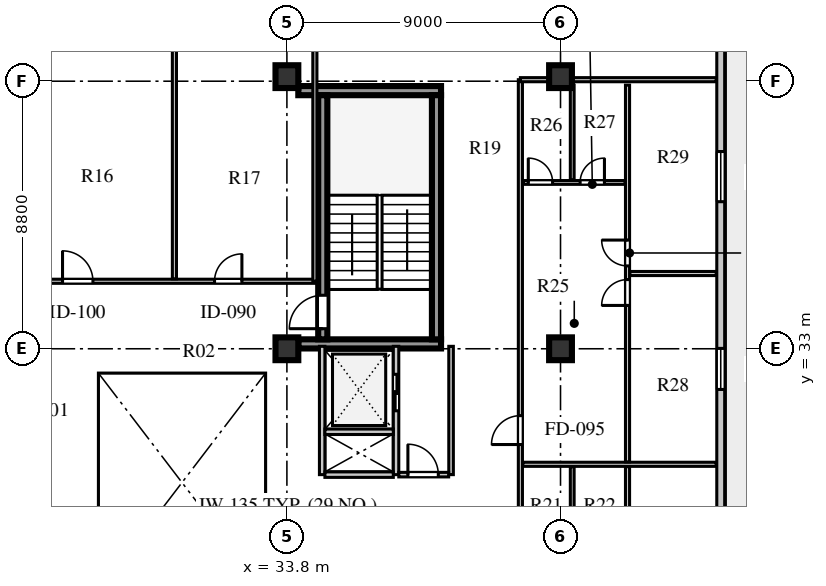
"""IFC4 building model, lengths in metres.
Left out: names, types, materials, properties, quantities, classifications, styles, units other than length and angle.
Written with IfcOpenShell. Run it as: python <this file> out.ifc"""

import sys

from ifc_helpers import new_model, si_unit, direction, frame, frame_2d, origin, origin_2d, place, context, subcontext, project, spatial, rectangle, extrude, element, fill, save


model = new_model("IFC4")
c1 = context("Model", 3, precision=1e-05, world=origin(), true_north=direction((0.0, 1.0)))
c2 = subcontext(c1, "Body", "Model", "MODEL_VIEW")
j1 = project(units=[si_unit("LENGTHUNIT", "METRE"), si_unit("PLANEANGLEUNIT", "RADIAN")], contexts=[c1])
p1 = place(None, origin())
s1 = spatial("IfcSite", under=j1, at=p1, CompositionType="ELEMENT")
p2 = place(p1, origin())
s2 = spatial("IfcBuilding", under=s1, at=p2, CompositionType="ELEMENT")
p3 = place(p2, frame((0.0, 0.0, 296.0)))
s3 = spatial("IfcBuildingStorey", under=s2, at=p3, CompositionType="ELEMENT", Elevation=296.0)
for number, where, z_axis, x_axis in (
    (1, (34.175, 33.16, 0.0), (0.0, 0.0, 1.0), (1.0, 0.0, 0.0)),
    (2, (34.175, 41.49, 0.0), (0.0, 0.0, 1.0), (1.0, 0.0, 0.0)),
):
    element("IfcWall", number, at=place(p3, frame(where, z_axis=z_axis, x_axis=x_axis)), inside=s3, PredefinedType="SHEAR", context=c2, shape_type="SweptSolid", body=[
        extrude(rectangle(XDim=4.695, YDim=0.3, at=frame_2d((2.348, 0.0))), origin(), (0.0, 0.0, 1.0), 3.66),
    ])
p4 = place(p3, frame((34.98, 33.31, 0.0), z_axis=(0.0, 0.0, 1.0), x_axis=(0.0, 1.0, 0.0)))
e3 = element("IfcWall", 3, at=p4, inside=s3, PredefinedType="SHEAR", context=c2, shape_type="SweptSolid", body=[
    extrude(rectangle(XDim=8.03, YDim=0.3, at=frame_2d((4.015, 0.0))), origin(), (0.0, 0.0, 1.0), 3.66),
])
p5 = place(p4, frame((0.35, 0.0, 0.0)))
e4 = element("IfcOpeningElement", 4, at=p5, cuts=e3, PredefinedType="OPENING", context=c2, shape_type="SweptSolid", body=[
    extrude(rectangle(XDim=1.1, YDim=2.1, at=frame_2d((0.55, 1.05))), frame((0.0, 0.16, 0.0), z_axis=(0.0, -1.0, 0.0), x_axis=(1.0, 0.0, 0.0)), (0.0, 0.0, 1.0), 0.32),
])
p6 = place(p3, frame((38.72, 33.31, 0.0), z_axis=(0.0, 0.0, 1.0), x_axis=(0.0, 1.0, 0.0)))
e5 = element("IfcWall", 5, at=p6, inside=s3, PredefinedType="SHEAR", context=c2, shape_type="SweptSolid", body=[
    extrude(rectangle(XDim=8.03, YDim=0.3, at=frame_2d((4.015, 0.0))), origin(), (0.0, 0.0, 1.0), 3.66),
])
for number, where, z_axis, x_axis in (
    (6, (33.8, 33.0, 0.0), (0.0, 0.0, 1.0), (1.0, 0.0, 0.0)),
    (7, (33.8, 41.95, 0.0), (0.0, 0.0, 1.0), (1.0, 0.0, 0.0)),
    (8, (42.8, 33.0, 0.0), (0.0, 0.0, 1.0), (1.0, 0.0, 0.0)),
    (9, (42.8, 41.95, 0.0), (0.0, 0.0, 1.0), (1.0, 0.0, 0.0)),
):
    element("IfcColumn", number, at=place(p3, frame(where, z_axis=z_axis, x_axis=x_axis)), inside=s3, PredefinedType="COLUMN", context=c2, shape_type="SweptSolid", body=[
        extrude(rectangle(XDim=0.75, YDim=0.75, at=origin_2d()), origin(), (0.0, 0.0, 1.0), 3.66),
    ])
p7 = place(p3, frame((48.07, 13.41, 0.0), z_axis=(0.0, 0.0, 1.0), x_axis=(0.0, 1.0, 0.0)))
e10 = element("IfcWall", 10, at=p7, inside=s3, PredefinedType="SOLIDWALL", context=c2, shape_type="SweptSolid", body=[
    extrude(rectangle(XDim=30.38, YDim=0.26, at=frame_2d((15.19, 0.0))), origin(), (0.0, 0.0, 1.0), 3.66),
])
p8 = place(p7, frame((2.43, 0.0, 0.0)))
e11 = element("IfcOpeningElement", 11, at=p8, cuts=e10, PredefinedType="OPENING", context=c2, shape_type="SweptSolid", body=[
    extrude(rectangle(XDim=1.0, YDim=2.05, at=frame_2d((0.5, 1.025))), frame((0.0, 0.14, 0.0), z_axis=(0.0, -1.0, 0.0), x_axis=(1.0, 0.0, 0.0)), (0.0, 0.0, 1.0), 0.28),
])
p9 = place(p7, frame((5.002, 0.0, 0.8)))
e12 = element("IfcOpeningElement", 12, at=p9, cuts=e10, PredefinedType="OPENING", context=c2, shape_type="SweptSolid", body=[
    extrude(rectangle(XDim=2.4, YDim=2.05, at=frame_2d((1.2, 1.025))), frame((0.0, 0.14, 0.0), z_axis=(0.0, -1.0, 0.0), x_axis=(1.0, 0.0, 0.0)), (0.0, 0.0, 1.0), 0.28),
])
p10 = place(p7, frame((11.302, 0.0, 0.8)))
e13 = element("IfcOpeningElement", 13, at=p10, cuts=e10, PredefinedType="OPENING", context=c2, shape_type="SweptSolid", body=[
    extrude(rectangle(XDim=2.1, YDim=1.95, at=frame_2d((1.05, 0.975))), frame((0.0, 0.14, 0.0), z_axis=(0.0, -1.0, 0.0), x_axis=(1.0, 0.0, 0.0)), (0.0, 0.0, 1.0), 0.28),
])
p11 = place(p7, frame((18.252, 0.0, 0.8)))
e14 = element("IfcOpeningElement", 14, at=p11, cuts=e10, PredefinedType="OPENING", context=c2, shape_type="SweptSolid", body=[
    extrude(rectangle(XDim=1.35, YDim=1.9, at=frame_2d((0.675, 0.95))), frame((0.0, 0.14, 0.0), z_axis=(0.0, -1.0, 0.0), x_axis=(1.0, 0.0, 0.0)), (0.0, 0.0, 1.0), 0.28),
])
p12 = place(p7, frame((24.427, 0.0, 0.8)))
e15 = element("IfcOpeningElement", 15, at=p12, cuts=e10, PredefinedType="OPENING", context=c2, shape_type="SweptSolid", body=[
    extrude(rectangle(XDim=1.65, YDim=1.95, at=frame_2d((0.825, 0.975))), frame((0.0, 0.14, 0.0), z_axis=(0.0, -1.0, 0.0), x_axis=(1.0, 0.0, 0.0)), (0.0, 0.0, 1.0), 0.28),
])
p13 = place(p3, frame((34.96, 28.86, 0.0), z_axis=(0.0, 0.0, 1.0), x_axis=(0.0, 1.0, 0.0)))
e16 = element("IfcWall", 16, at=p13, inside=s3, PredefinedType="SOLIDWALL", context=c2, shape_type="SweptSolid", body=[
    extrude(rectangle(XDim=4.22, YDim=0.18, at=frame_2d((2.11, 0.0))), origin(), (0.0, 0.0, 1.0), 3.66),
])
p14 = place(p3, frame((37.39, 28.86, 0.0), z_axis=(0.0, 0.0, 1.0), x_axis=(0.0, 1.0, 0.0)))
e17 = element("IfcWall", 17, at=p14, inside=s3, PredefinedType="SOLIDWALL", context=c2, shape_type="SweptSolid", body=[
    extrude(rectangle(XDim=4.22, YDim=0.18, at=frame_2d((2.11, 0.0))), origin(), (0.0, 0.0, 1.0), 3.66),
])
p15 = place(p14, frame((2.1, 0.0, 0.0)))
e18 = element("IfcOpeningElement", 18, at=p15, cuts=e17, PredefinedType="OPENING", context=c2, shape_type="SweptSolid", body=[
    extrude(rectangle(XDim=1.2, YDim=2.12, at=frame_2d((0.6, 1.06))), frame((0.0, 0.1, 0.0), z_axis=(0.0, -1.0, 0.0), x_axis=(1.0, 0.0, 0.0)), (0.0, 0.0, 1.0), 0.2),
])
for number, where, z_axis, x_axis in (
    (19, (35.05, 28.86, 0.0), (0.0, 0.0, 1.0), (1.0, 0.0, 0.0)),
    (20, (35.05, 30.27, 0.0), (0.0, 0.0, 1.0), (1.0, 0.0, 0.0)),
):
    element("IfcWall", number, at=place(p3, frame(where, z_axis=z_axis, x_axis=x_axis)), inside=s3, PredefinedType="SOLIDWALL", context=c2, shape_type="SweptSolid", body=[
        extrude(rectangle(XDim=2.25, YDim=0.18, at=frame_2d((1.125, 0.0))), origin(), (0.0, 0.0, 1.0), 3.66),
    ])
p16 = place(p3, frame((39.2, 28.86, 0.0), z_axis=(0.0, 0.0, 1.0), x_axis=(0.0, 1.0, 0.0)))
e21 = element("IfcWall", 21, at=p16, inside=s3, PredefinedType="PARTITIONING", context=c2, shape_type="SweptSolid", body=[
    extrude(rectangle(XDim=4.22, YDim=0.15, at=frame_2d((2.11, 0.0))), origin(), (0.0, 0.0, 1.0), 3.66),
])
p17 = place(p3, frame((37.48, 28.86, 0.0), z_axis=(0.0, 0.0, 1.0), x_axis=(1.0, 0.0, 0.0)))
e22 = element("IfcWall", 22, at=p17, inside=s3, PredefinedType="PARTITIONING", context=c2, shape_type="SweptSolid", body=[
    extrude(rectangle(XDim=1.64, YDim=0.15, at=frame_2d((0.82, 0.0))), origin(), (0.0, 0.0, 1.0), 3.66),
])
p18 = place(p17, frame((0.3, 0.0, 0.0)))
e23 = element("IfcOpeningElement", 23, at=p18, cuts=e22, PredefinedType="OPENING", context=c2, shape_type="SweptSolid", body=[
    extrude(rectangle(XDim=1.0, YDim=2.1, at=frame_2d((0.5, 1.05))), frame((0.0, 0.085, 0.0), z_axis=(0.0, -1.0, 0.0), x_axis=(1.0, 0.0, 0.0)), (0.0, 0.0, 1.0), 0.17),
])
p19 = place(p3, frame((25.22, 35.22, 0.0), z_axis=(0.0, 0.0, 1.0), x_axis=(1.0, 0.0, 0.0)))
e24 = element("IfcWall", 24, at=p19, inside=s3, PredefinedType="PARTITIONING", context=c2, shape_type="SweptSolid", body=[
    extrude(rectangle(XDim=9.5, YDim=0.135, at=frame_2d((4.75, 0.0))), origin(), (0.0, 0.0, 1.0), 3.66),
])
p20 = place(p19, frame((1.2, 0.0, 0.0)))
e25 = element("IfcOpeningElement", 25, at=p20, cuts=e24, PredefinedType="OPENING", context=c2, shape_type="SweptSolid", body=[
    extrude(rectangle(XDim=1.0, YDim=2.08, at=frame_2d((0.5, 1.04))), frame((0.0, 0.078, 0.0), z_axis=(0.0, -1.0, 0.0), x_axis=(1.0, 0.0, 0.0)), (0.0, 0.0, 1.0), 0.155),
])
p21 = place(p19, frame((6.2, 0.0, 0.0)))
e26 = element("IfcOpeningElement", 26, at=p21, cuts=e24, PredefinedType="OPENING", context=c2, shape_type="SweptSolid", body=[
    extrude(rectangle(XDim=0.9, YDim=2.08, at=frame_2d((0.45, 1.04))), frame((0.0, 0.078, 0.0), z_axis=(0.0, -1.0, 0.0), x_axis=(1.0, 0.0, 0.0)), (0.0, 0.0, 1.0), 0.155),
])
p22 = place(p3, frame((34.72, 35.22, 0.0), z_axis=(0.0, 0.0, 1.0), x_axis=(0.0, 1.0, 0.0)))
e27 = element("IfcWall", 27, at=p22, inside=s3, PredefinedType="PARTITIONING", context=c2, shape_type="SweptSolid", body=[
    extrude(rectangle(XDim=11.6, YDim=0.135, at=frame_2d((5.8, 0.0))), origin(), (0.0, 0.0, 1.0), 3.66),
])
p23 = place(p3, frame((30.1, 35.3, 0.0), z_axis=(0.0, 0.0, 1.0), x_axis=(0.0, 1.0, 0.0)))
e28 = element("IfcWall", 28, at=p23, inside=s3, PredefinedType="PARTITIONING", context=c2, shape_type="SweptSolid", body=[
    extrude(rectangle(XDim=11.52, YDim=0.135, at=frame_2d((5.76, 0.0))), origin(), (0.0, 0.0, 1.0), 3.66),
])
p24 = place(p3, frame((41.48, 15.35, 0.0), z_axis=(0.0, 0.0, 1.0), x_axis=(0.0, 1.0, 0.0)))
e29 = element("IfcWall", 29, at=p24, inside=s3, PredefinedType="PARTITIONING", context=c2, shape_type="SweptSolid", body=[
    extrude(rectangle(XDim=26.5, YDim=0.135, at=frame_2d((13.25, 0.0))), origin(), (0.0, 0.0, 1.0), 3.66),
])
p25 = place(p24, frame((0.75, 0.0, 0.0)))
e30 = element("IfcOpeningElement", 30, at=p25, cuts=e29, PredefinedType="OPENING", context=c2, shape_type="SweptSolid", body=[
    extrude(rectangle(XDim=0.95, YDim=2.1, at=frame_2d((0.475, 1.05))), frame((0.0, 0.078, 0.0), z_axis=(0.0, -1.0, 0.0), x_axis=(1.0, 0.0, 0.0)), (0.0, 0.0, 1.0), 0.155),
])
p26 = place(p24, frame((14.5, 0.0, 0.0)))
e31 = element("IfcOpeningElement", 31, at=p26, cuts=e29, PredefinedType="OPENING", context=c2, shape_type="SweptSolid", body=[
    extrude(rectangle(XDim=0.95, YDim=2.1, at=frame_2d((0.475, 1.05))), frame((0.0, 0.078, 0.0), z_axis=(0.0, -1.0, 0.0), x_axis=(1.0, 0.0, 0.0)), (0.0, 0.0, 1.0), 0.155),
])
p27 = place(p3, frame((41.48, 41.85, 0.0), z_axis=(0.0, 0.0, 1.0), x_axis=(1.0, 0.0, 0.0)))
e32 = element("IfcWall", 32, at=p27, inside=s3, PredefinedType="PARTITIONING", context=c2, shape_type="SweptSolid", body=[
    extrude(rectangle(XDim=6.44, YDim=0.135, at=frame_2d((3.22, 0.0))), origin(), (0.0, 0.0, 1.0), 3.06),
])
p28 = place(p3, frame((45.004, 15.53, 0.0), z_axis=(0.0, 0.0, 1.0), x_axis=(0.0, 1.0, 0.0)))
e33 = element("IfcWall", 33, at=p28, inside=s3, PredefinedType="PARTITIONING", context=c2, shape_type="SweptSolid", body=[
    extrude(rectangle(XDim=13.59, YDim=0.135, at=frame_2d((6.795, 0.0))), origin(), (0.0, 0.0, 1.0), 3.66),
])
p29 = place(p28, frame((5.745, 0.0, 0.0)))
e34 = element("IfcOpeningElement", 34, at=p29, cuts=e33, PredefinedType="OPENING", context=c2, shape_type="SweptSolid", body=[
    extrude(rectangle(XDim=0.85, YDim=2.08, at=frame_2d((0.425, 1.04))), frame((0.0, 0.078, 0.0), z_axis=(0.0, -1.0, 0.0), x_axis=(1.0, 0.0, 0.0)), (0.0, 0.0, 1.0), 0.155),
])
p30 = place(p28, frame((7.045, 0.0, 0.0)))
e35 = element("IfcOpeningElement", 35, at=p30, cuts=e33, PredefinedType="OPENING", context=c2, shape_type="SweptSolid", body=[
    extrude(rectangle(XDim=0.85, YDim=2.08, at=frame_2d((0.425, 1.04))), frame((0.0, 0.078, 0.0), z_axis=(0.0, -1.0, 0.0), x_axis=(1.0, 0.0, 0.0)), (0.0, 0.0, 1.0), 0.155),
])
p31 = place(p3, frame((43.185, 26.0, 0.0), z_axis=(0.0, 0.0, 1.0), x_axis=(0.0, 1.0, 0.0)))
e36 = element("IfcWall", 36, at=p31, inside=s3, PredefinedType="PLUMBINGWALL", context=c2, shape_type="SweptSolid", body=[
    extrude(rectangle(XDim=3.12, YDim=0.125, at=frame_2d((1.56, 0.0))), origin(), (0.0, 0.0, 1.0), 3.66),
])
p32 = place(p3, frame((41.56, 29.2, 0.0), z_axis=(0.0, 0.0, 1.0), x_axis=(1.0, 0.0, 0.0)))
e37 = element("IfcWall", 37, at=p32, inside=s3, PredefinedType="PARTITIONING", context=c2, shape_type="SweptSolid", body=[
    extrude(rectangle(XDim=6.36, YDim=0.135, at=frame_2d((3.18, 0.0))), origin(), (0.0, 0.0, 1.0), 3.66),
])
p33 = place(p3, frame((45.004, 29.28, 0.0), z_axis=(0.0, 0.0, 1.0), x_axis=(0.0, 1.0, 0.0)))
e38 = element("IfcWall", 38, at=p33, inside=s3, PredefinedType="PARTITIONING", context=c2, shape_type="SweptSolid", body=[
    extrude(rectangle(XDim=12.39, YDim=0.135, at=frame_2d((6.195, 0.0))), origin(), (0.0, 0.0, 1.0), 3.66),
])
p34 = place(p33, frame((5.145, 0.0, 0.0)))
e39 = element("IfcOpeningElement", 39, at=p34, cuts=e38, PredefinedType="OPENING", context=c2, shape_type="SweptSolid", body=[
    extrude(rectangle(XDim=0.85, YDim=2.08, at=frame_2d((0.425, 1.04))), frame((0.0, 0.078, 0.0), z_axis=(0.0, -1.0, 0.0), x_axis=(1.0, 0.0, 0.0)), (0.0, 0.0, 1.0), 0.155),
])
p35 = place(p33, frame((6.445, 0.0, 0.0)))
e40 = element("IfcOpeningElement", 40, at=p35, cuts=e38, PredefinedType="OPENING", context=c2, shape_type="SweptSolid", body=[
    extrude(rectangle(XDim=0.85, YDim=2.08, at=frame_2d((0.425, 1.04))), frame((0.0, 0.078, 0.0), z_axis=(0.0, -1.0, 0.0), x_axis=(1.0, 0.0, 0.0)), (0.0, 0.0, 1.0), 0.155),
])
p36 = place(p3, frame((41.58, 38.47, 0.0), z_axis=(0.0, 0.0, 1.0), x_axis=(1.0, 0.0, 0.0)))
e41 = element("IfcWall", 41, at=p36, inside=s3, PredefinedType="PLUMBINGWALL", context=c2, shape_type="SweptSolid", body=[
    extrude(rectangle(XDim=3.344, YDim=0.125, at=frame_2d((1.672, 0.0))), origin(), (0.0, 0.0, 1.0), 3.66),
])
p37 = place(p36, frame((0.16, 0.0, 0.0)))
e42 = element("IfcOpeningElement", 42, at=p37, cuts=e41, PredefinedType="OPENING", context=c2, shape_type="SweptSolid", body=[
    extrude(rectangle(XDim=0.8, YDim=2.05, at=frame_2d((0.4, 1.025))), frame((0.0, 0.073, 0.0), z_axis=(0.0, -1.0, 0.0), x_axis=(1.0, 0.0, 0.0)), (0.0, 0.0, 1.0), 0.145),
])
p38 = place(p36, frame((1.865, 0.0, 0.0)))
e43 = element("IfcOpeningElement", 43, at=p38, cuts=e41, PredefinedType="OPENING", context=c2, shape_type="SweptSolid", body=[
    extrude(rectangle(XDim=0.8, YDim=2.05, at=frame_2d((0.4, 1.025))), frame((0.0, 0.073, 0.0), z_axis=(0.0, -1.0, 0.0), x_axis=(1.0, 0.0, 0.0)), (0.0, 0.0, 1.0), 0.145),
])
p39 = place(p3, frame((43.185, 38.55, 0.0), z_axis=(0.0, 0.0, 1.0), x_axis=(0.0, 1.0, 0.0)))
e44 = element("IfcWall", 44, at=p39, inside=s3, PredefinedType="PLUMBINGWALL", context=c2, shape_type="SweptSolid", body=[
    extrude(rectangle(XDim=3.12, YDim=0.125, at=frame_2d((1.56, 0.0))), origin(), (0.0, 0.0, 1.0), 3.66),
])
p40 = place(p3, frame((45.084, 35.475, 0.0), z_axis=(0.0, 0.0, 1.0), x_axis=(1.0, 0.0, 0.0)))
e45 = element("IfcWall", 45, at=p40, inside=s3, PredefinedType="PARTITIONING", context=c2, shape_type="SweptSolid", body=[
    extrude(rectangle(XDim=2.836, YDim=0.135, at=frame_2d((1.418, 0.0))), origin(), (0.0, 0.0, 1.0), 3.66),
])
p41 = place(p11, origin())
e46 = element("IfcWindow", 46, at=p41, inside=s3, PartitioningType="SINGLE_PANEL", PredefinedType="WINDOW", context=c2, shape_type="SweptSolid", body=[
    extrude(rectangle(XDim=1.35, YDim=1.9, at=frame_2d((0.675, 0.95))), frame((0.0, 0.03, 0.0), z_axis=(0.0, -1.0, 0.0), x_axis=(1.0, 0.0, 0.0)), (0.0, 0.0, 1.0), 0.06),
])
fill(e14, e46)
p42 = place(p12, origin())
e47 = element("IfcWindow", 47, at=p42, inside=s3, PartitioningType="SINGLE_PANEL", PredefinedType="WINDOW", context=c2, shape_type="SweptSolid", body=[
    extrude(rectangle(XDim=1.65, YDim=1.95, at=frame_2d((0.825, 0.975))), frame((0.0, 0.03, 0.0), z_axis=(0.0, -1.0, 0.0), x_axis=(1.0, 0.0, 0.0)), (0.0, 0.0, 1.0), 0.06),
])
fill(e15, e47)
p43 = place(p5, origin())
e48 = element("IfcDoor", 48, at=p43, inside=s3, OperationType="SINGLE_SWING_LEFT", PredefinedType="DOOR", context=c2, shape_type="SweptSolid", body=[
    extrude(rectangle(XDim=1.1, YDim=2.1, at=frame_2d((0.55, 1.05))), frame((0.0, 0.025, 0.0), z_axis=(0.0, -1.0, 0.0), x_axis=(1.0, 0.0, 0.0)), (0.0, 0.0, 1.0), 0.05),
])
fill(e4, e48)
p44 = place(p15, frame((1.2, 0.0, 0.0), z_axis=(0.0, 0.0, 1.0), x_axis=(-1.0, 0.0, 0.0)))
e49 = element("IfcDoor", 49, at=p44, inside=s3, OperationType="DOUBLE_DOOR_SLIDING", PredefinedType="DOOR", context=c2, shape_type="SweptSolid", body=[
    extrude(rectangle(XDim=1.2, YDim=2.12, at=frame_2d((0.6, 1.06))), frame((0.0, 0.025, 0.0), z_axis=(0.0, -1.0, 0.0), x_axis=(1.0, 0.0, 0.0)), (0.0, 0.0, 1.0), 0.05),
])
fill(e18, e49)
p45 = place(p18, origin())
e50 = element("IfcDoor", 50, at=p45, inside=s3, OperationType="SINGLE_SWING_LEFT", PredefinedType="DOOR", context=c2, shape_type="SweptSolid", body=[
    extrude(rectangle(XDim=1.0, YDim=2.1, at=frame_2d((0.5, 1.05))), frame((0.0, 0.025, 0.0), z_axis=(0.0, -1.0, 0.0), x_axis=(1.0, 0.0, 0.0)), (0.0, 0.0, 1.0), 0.05),
])
fill(e23, e50)
p46 = place(p20, origin())
e51 = element("IfcDoor", 51, at=p46, inside=s3, OperationType="SINGLE_SWING_LEFT", PredefinedType="DOOR", context=c2, shape_type="SweptSolid", body=[
    extrude(rectangle(XDim=1.0, YDim=2.08, at=frame_2d((0.5, 1.04))), frame((0.0, 0.025, 0.0), z_axis=(0.0, -1.0, 0.0), x_axis=(1.0, 0.0, 0.0)), (0.0, 0.0, 1.0), 0.05),
])
fill(e25, e51)
p47 = place(p21, origin())
e52 = element("IfcDoor", 52, at=p47, inside=s3, OperationType="SINGLE_SWING_RIGHT", PredefinedType="DOOR", context=c2, shape_type="SweptSolid", body=[
    extrude(rectangle(XDim=0.9, YDim=2.08, at=frame_2d((0.45, 1.04))), frame((0.0, 0.025, 0.0), z_axis=(0.0, -1.0, 0.0), x_axis=(1.0, 0.0, 0.0)), (0.0, 0.0, 1.0), 0.05),
])
fill(e26, e52)
p48 = place(p37, origin())
e53 = element("IfcDoor", 53, at=p48, inside=s3, OperationType="SINGLE_SWING_LEFT", PredefinedType="DOOR", context=c2, shape_type="SweptSolid", body=[
    extrude(rectangle(XDim=0.8, YDim=2.05, at=frame_2d((0.4, 1.025))), frame((0.0, 0.025, 0.0), z_axis=(0.0, -1.0, 0.0), x_axis=(1.0, 0.0, 0.0)), (0.0, 0.0, 1.0), 0.05),
])
fill(e42, e53)
p49 = place(p38, origin())
e54 = element("IfcDoor", 54, at=p49, inside=s3, OperationType="SINGLE_SWING_RIGHT", PredefinedType="DOOR", context=c2, shape_type="SweptSolid", body=[
    extrude(rectangle(XDim=0.8, YDim=2.05, at=frame_2d((0.4, 1.025))), frame((0.0, 0.025, 0.0), z_axis=(0.0, -1.0, 0.0), x_axis=(1.0, 0.0, 0.0)), (0.0, 0.0, 1.0), 0.05),
])
fill(e43, e54)
p50 = place(p34, origin())
e55 = element("IfcDoor", 55, at=p50, inside=s3, OperationType="SINGLE_SWING_LEFT", PredefinedType="DOOR", context=c2, shape_type="SweptSolid", body=[
    extrude(rectangle(XDim=0.85, YDim=2.08, at=frame_2d((0.425, 1.04))), frame((0.0, 0.025, 0.0), z_axis=(0.0, -1.0, 0.0), x_axis=(1.0, 0.0, 0.0)), (0.0, 0.0, 1.0), 0.05),
])
fill(e39, e55)
p51 = place(p35, origin())
e56 = element("IfcDoor", 56, at=p51, inside=s3, OperationType="SINGLE_SWING_RIGHT", PredefinedType="DOOR", context=c2, shape_type="SweptSolid", body=[
    extrude(rectangle(XDim=0.85, YDim=2.08, at=frame_2d((0.425, 1.04))), frame((0.0, 0.025, 0.0), z_axis=(0.0, -1.0, 0.0), x_axis=(1.0, 0.0, 0.0)), (0.0, 0.0, 1.0), 0.05),
])
fill(e40, e56)
p52 = place(p26, origin())
e57 = element("IfcDoor", 57, at=p52, inside=s3, OperationType="SINGLE_SWING_LEFT", PredefinedType="DOOR", context=c2, shape_type="SweptSolid", body=[
    extrude(rectangle(XDim=0.95, YDim=2.1, at=frame_2d((0.475, 1.05))), frame((0.0, 0.025, 0.0), z_axis=(0.0, -1.0, 0.0), x_axis=(1.0, 0.0, 0.0)), (0.0, 0.0, 1.0), 0.05),
])
fill(e31, e57)
save(model, sys.argv[1])
